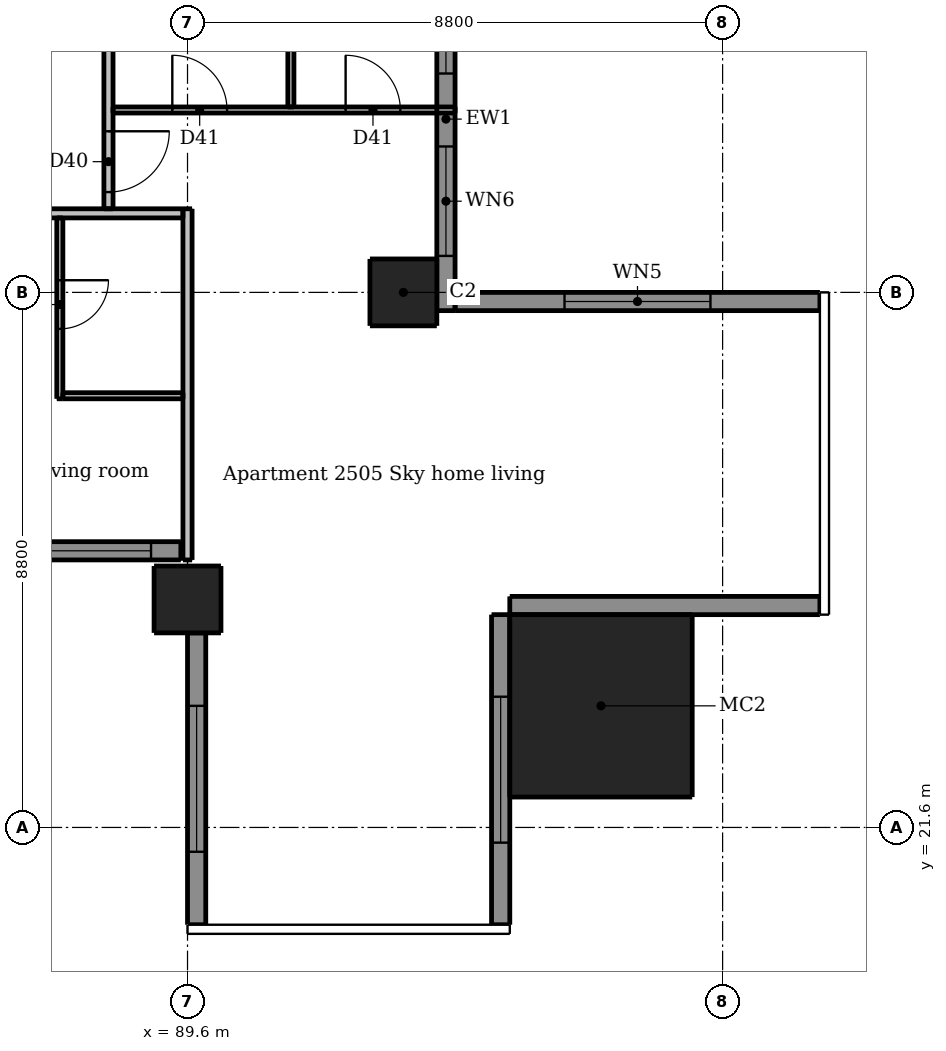
"""IFC4 building model, lengths in metres.
Left out: names, types, materials, properties, quantities, classifications, styles, units other than length and angle.
Written with IfcOpenShell. Run it as: python <this file> out.ifc"""

import sys

from ifc_helpers import new_model, si_unit, direction, frame, frame_2d, origin, origin_2d, place, context, subcontext, project, spatial, rectangle, extrude, element, fill, save


model = new_model("IFC4")
c1 = context("Model", 3, precision=1e-05, world=origin(), true_north=direction((0.0, 1.0)))
c2 = subcontext(c1, "Body", "Model", "MODEL_VIEW")
j1 = project(units=[si_unit("LENGTHUNIT", "METRE"), si_unit("PLANEANGLEUNIT", "RADIAN")], contexts=[c1])
p1 = place(None, origin())
s1 = spatial("IfcSite", under=j1, at=p1, CompositionType="ELEMENT")
p2 = place(p1, origin())
s2 = spatial("IfcBuilding", under=s1, at=p2, CompositionType="ELEMENT")
p3 = place(p2, frame((0.0, 0.0, 95.2)))
s3 = spatial("IfcBuildingStorey", under=s2, at=p3, CompositionType="ELEMENT", Elevation=95.2)
for number, where, z_axis, x_axis in (
    (1, (89.6, 25.35, 0.0), (0.0, 0.0, 1.0), (1.0, 0.0, 0.0)),
    (2, (93.15, 30.4, 0.0), (0.0, 0.0, 1.0), (1.0, 0.0, 0.0)),
):
    element("IfcColumn", number, at=place(p3, frame(where, z_axis=z_axis, x_axis=x_axis)), inside=s3, PredefinedType="COLUMN", context=c2, shape_type="SweptSolid", body=[
        extrude(rectangle(XDim=1.1, YDim=1.1, at=origin_2d()), origin(), (0.0, 0.0, 1.0), 3.05),
    ])
p4 = place(p3, frame((96.4, 23.6, 0.0), z_axis=(0.0, 0.0, 1.0), x_axis=(1.0, 0.0, 0.0)))
e3 = element("IfcColumn", 3, at=p4, inside=s3, PredefinedType="COLUMN", context=c2, shape_type="SweptSolid", body=[
    extrude(rectangle(XDim=3.0, YDim=3.0, at=origin_2d()), origin(), (0.0, 0.0, 1.0), 3.3),
])
p5 = place(p3, frame((89.75, 24.8, 0.0), z_axis=(0.0, 0.0, 1.0), x_axis=(0.0, -1.0, 0.0)))
e4 = element("IfcWall", 4, at=p5, inside=s3, PredefinedType="SOLIDWALL", context=c2, shape_type="SweptSolid", body=[
    extrude(rectangle(XDim=4.8, YDim=0.3, at=frame_2d((2.4, 0.0))), origin(), (0.0, 0.0, 1.0), 3.05),
])
p6 = place(p5, frame((1.2, 0.0, 0.15)))
e5 = element("IfcOpeningElement", 5, at=p6, cuts=e4, PredefinedType="OPENING", context=c2, shape_type="SweptSolid", body=[
    extrude(rectangle(XDim=2.4, YDim=2.1, at=frame_2d((1.2, 1.05))), frame((0.0, 0.16, 0.0), z_axis=(0.0, -1.0, 0.0), x_axis=(1.0, 0.0, 0.0)), (0.0, 0.0, 1.0), 0.32),
])
p7 = place(p3, frame((94.75, 20.0, 0.0), z_axis=(0.0, 0.0, 1.0), x_axis=(0.0, 1.0, 0.0)))
e6 = element("IfcWall", 6, at=p7, inside=s3, PredefinedType="SOLIDWALL", context=c2, shape_type="SweptSolid", body=[
    extrude(rectangle(XDim=5.1, YDim=0.3, at=frame_2d((2.55, 0.0))), origin(), (0.0, 0.0, 1.0), 3.05),
])
p8 = place(p7, frame((1.35, 0.0, 0.15)))
e7 = element("IfcOpeningElement", 7, at=p8, cuts=e6, PredefinedType="OPENING", context=c2, shape_type="SweptSolid", body=[
    extrude(rectangle(XDim=2.4, YDim=2.1, at=frame_2d((1.2, 1.05))), frame((0.0, 0.16, 0.0), z_axis=(0.0, -1.0, 0.0), x_axis=(1.0, 0.0, 0.0)), (0.0, 0.0, 1.0), 0.32),
])
p9 = place(p3, frame((94.9, 25.25, 0.0), z_axis=(0.0, 0.0, 1.0), x_axis=(1.0, 0.0, 0.0)))
e8 = element("IfcWall", 8, at=p9, inside=s3, PredefinedType="SOLIDWALL", context=c2, shape_type="SweptSolid", body=[
    extrude(rectangle(XDim=5.1, YDim=0.3, at=frame_2d((2.55, 0.0))), origin(), (0.0, 0.0, 1.0), 3.05),
])
p10 = place(p3, frame((100.0, 30.25, 0.0), z_axis=(0.0, 0.0, 1.0), x_axis=(-1.0, 0.0, 0.0)))
e9 = element("IfcWall", 9, at=p10, inside=s3, PredefinedType="SOLIDWALL", context=c2, shape_type="SweptSolid", body=[
    extrude(rectangle(XDim=6.0, YDim=0.3, at=frame_2d((3.0, 0.0))), origin(), (0.0, 0.0, 1.0), 3.05),
])
p11 = place(p10, frame((1.8, 0.0, 0.15)))
e10 = element("IfcOpeningElement", 10, at=p11, cuts=e9, PredefinedType="OPENING", context=c2, shape_type="SweptSolid", body=[
    extrude(rectangle(XDim=2.4, YDim=2.1, at=frame_2d((1.2, 1.05))), frame((0.0, 0.16, 0.0), z_axis=(0.0, -1.0, 0.0), x_axis=(1.0, 0.0, 0.0)), (0.0, 0.0, 1.0), 0.32),
])
p12 = place(p3, frame((83.7, 26.15, 0.0), z_axis=(0.0, 0.0, 1.0), x_axis=(1.0, 0.0, 0.0)))
e11 = element("IfcWall", 11, at=p12, inside=s3, PredefinedType="SOLIDWALL", context=c2, shape_type="SweptSolid", body=[
    extrude(rectangle(XDim=5.79, YDim=0.3, at=frame_2d((2.895, 0.0))), origin(), (0.0, 0.0, 1.0), 3.05),
])
p13 = place(p12, frame((0.5, 0.0, 0.15)))
e12 = element("IfcOpeningElement", 12, at=p13, cuts=e11, PredefinedType="OPENING", context=c2, shape_type="SweptSolid", body=[
    extrude(rectangle(XDim=1.8, YDim=2.1, at=frame_2d((0.9, 1.05))), frame((0.0, 0.16, 0.0), z_axis=(0.0, -1.0, 0.0), x_axis=(1.0, 0.0, 0.0)), (0.0, 0.0, 1.0), 0.32),
])
p14 = place(p12, frame((3.5, 0.0, 0.15)))
e13 = element("IfcOpeningElement", 13, at=p14, cuts=e11, PredefinedType="OPENING", context=c2, shape_type="SweptSolid", body=[
    extrude(rectangle(XDim=1.8, YDim=2.1, at=frame_2d((0.9, 1.05))), frame((0.0, 0.16, 0.0), z_axis=(0.0, -1.0, 0.0), x_axis=(1.0, 0.0, 0.0)), (0.0, 0.0, 1.0), 0.32),
])
p15 = place(p3, frame((93.85, 30.1, 0.0), z_axis=(0.0, 0.0, 1.0), x_axis=(0.0, 1.0, 0.0)))
e14 = element("IfcWall", 14, at=p15, inside=s3, PredefinedType="SOLIDWALL", context=c2, shape_type="SweptSolid", body=[
    extrude(rectangle(XDim=6.3, YDim=0.3, at=frame_2d((3.15, 0.0))), origin(), (0.0, 0.0, 1.0), 3.05),
])
p16 = place(p15, frame((0.9, 0.0, 0.15)))
e15 = element("IfcOpeningElement", 15, at=p16, cuts=e14, PredefinedType="OPENING", context=c2, shape_type="SweptSolid", body=[
    extrude(rectangle(XDim=1.8, YDim=2.1, at=frame_2d((0.9, 1.05))), frame((0.0, 0.16, 0.0), z_axis=(0.0, -1.0, 0.0), x_axis=(1.0, 0.0, 0.0)), (0.0, 0.0, 1.0), 0.32),
])
p17 = place(p15, frame((3.9, 0.0, 0.15)))
e16 = element("IfcOpeningElement", 16, at=p17, cuts=e14, PredefinedType="OPENING", context=c2, shape_type="SweptSolid", body=[
    extrude(rectangle(XDim=1.8, YDim=2.1, at=frame_2d((0.9, 1.05))), frame((0.0, 0.16, 0.0), z_axis=(0.0, -1.0, 0.0), x_axis=(1.0, 0.0, 0.0)), (0.0, 0.0, 1.0), 0.32),
])
p18 = place(p3, frame((87.5, 31.625, 0.0), z_axis=(0.0, 0.0, 1.0), x_axis=(0.0, -1.0, 0.0)))
e17 = element("IfcWall", 17, at=p18, inside=s3, PredefinedType="PARTITIONING", context=c2, shape_type="SweptSolid", body=[
    extrude(rectangle(XDim=2.975, YDim=0.1, at=frame_2d((1.488, 0.0))), origin(), (0.0, 0.0, 1.0), 3.05),
])
p19 = place(p18, frame((1.025, 0.0, 0.0)))
e18 = element("IfcOpeningElement", 18, at=p19, cuts=e17, PredefinedType="OPENING", context=c2, shape_type="SweptSolid", body=[
    extrude(rectangle(XDim=0.8, YDim=2.1, at=frame_2d((0.4, 1.05))), frame((0.0, 0.06, 0.0), z_axis=(0.0, -1.0, 0.0), x_axis=(1.0, 0.0, 0.0)), (0.0, 0.0, 1.0), 0.12),
])
p20 = place(p3, frame((91.3, 33.45, 0.0), z_axis=(0.0, 0.0, 1.0), x_axis=(0.0, 1.0, 0.0)))
e19 = element("IfcWall", 19, at=p20, inside=s3, PredefinedType="PARTITIONING", context=c2, shape_type="SweptSolid", body=[
    extrude(rectangle(XDim=5.875, YDim=0.1, at=frame_2d((2.938, 0.0))), origin(), (0.0, 0.0, 1.0), 3.05),
])
p21 = place(p20, frame((3.75, 0.0, 0.0)))
e20 = element("IfcOpeningElement", 20, at=p21, cuts=e19, PredefinedType="OPENING", context=c2, shape_type="SweptSolid", body=[
    extrude(rectangle(XDim=0.8, YDim=2.1, at=frame_2d((0.4, 1.05))), frame((0.0, 0.06, 0.0), z_axis=(0.0, -1.0, 0.0), x_axis=(1.0, 0.0, 0.0)), (0.0, 0.0, 1.0), 0.12),
])
p22 = place(p3, frame((88.375, 33.4, 0.0), z_axis=(0.0, 0.0, 1.0), x_axis=(1.0, 0.0, 0.0)))
e21 = element("IfcWall", 21, at=p22, inside=s3, PredefinedType="PARTITIONING", context=c2, shape_type="SweptSolid", body=[
    extrude(rectangle(XDim=5.625, YDim=0.1, at=frame_2d((2.812, 0.0))), origin(), (0.0, 0.0, 1.0), 3.05),
])
p23 = place(p22, frame((0.975, 0.0, 0.0)))
e22 = element("IfcOpeningElement", 22, at=p23, cuts=e21, PredefinedType="OPENING", context=c2, shape_type="SweptSolid", body=[
    extrude(rectangle(XDim=0.9, YDim=2.1, at=frame_2d((0.45, 1.05))), frame((0.0, 0.06, 0.0), z_axis=(0.0, -1.0, 0.0), x_axis=(1.0, 0.0, 0.0)), (0.0, 0.0, 1.0), 0.12),
])
p24 = place(p22, frame((3.825, 0.0, 0.0)))
e23 = element("IfcOpeningElement", 23, at=p24, cuts=e21, PredefinedType="OPENING", context=c2, shape_type="SweptSolid", body=[
    extrude(rectangle(XDim=0.9, YDim=2.1, at=frame_2d((0.45, 1.05))), frame((0.0, 0.06, 0.0), z_axis=(0.0, -1.0, 0.0), x_axis=(1.0, 0.0, 0.0)), (0.0, 0.0, 1.0), 0.12),
])
p25 = place(p3, frame((87.55, 28.7, 0.0), z_axis=(0.0, 0.0, 1.0), x_axis=(1.0, 0.0, 0.0)))
e24 = element("IfcWall", 24, at=p25, inside=s3, PredefinedType="PARTITIONING", context=c2, shape_type="SweptSolid", body=[
    extrude(rectangle(XDim=1.975, YDim=0.1, at=frame_2d((0.987, 0.0))), origin(), (0.0, 0.0, 1.0), 3.05),
])
p26 = place(p3, frame((88.3, 60.475, 0.0), z_axis=(0.0, 0.0, 1.0), x_axis=(0.0, -1.0, 0.0)))
e25 = element("IfcWall", 25, at=p26, inside=s3, PredefinedType="PARTITIONING", context=c2, shape_type="SweptSolid", body=[
    extrude(rectangle(XDim=28.7, YDim=0.15, at=frame_2d((14.35, 0.0))), origin(), (0.0, 0.0, 1.0), 3.05),
])
p27 = place(p26, frame((27.425, 0.0, 0.0)))
e26 = element("IfcOpeningElement", 26, at=p27, cuts=e25, PredefinedType="OPENING", context=c2, shape_type="SweptSolid", body=[
    extrude(rectangle(XDim=1.0, YDim=2.1, at=frame_2d((0.5, 1.05))), frame((0.0, 0.085, 0.0), z_axis=(0.0, -1.0, 0.0), x_axis=(1.0, 0.0, 0.0)), (0.0, 0.0, 1.0), 0.17),
])
p28 = place(p26, frame((17.575, 0.0, 0.0)))
e27 = element("IfcOpeningElement", 27, at=p28, cuts=e25, PredefinedType="OPENING", context=c2, shape_type="SweptSolid", body=[
    extrude(rectangle(XDim=1.0, YDim=2.1, at=frame_2d((0.5, 1.05))), frame((0.0, 0.085, 0.0), z_axis=(0.0, -1.0, 0.0), x_axis=(1.0, 0.0, 0.0)), (0.0, 0.0, 1.0), 0.17),
])
p29 = place(p26, frame((11.575, 0.0, 0.0)))
e28 = element("IfcOpeningElement", 28, at=p29, cuts=e25, PredefinedType="OPENING", context=c2, shape_type="SweptSolid", body=[
    extrude(rectangle(XDim=1.0, YDim=2.1, at=frame_2d((0.5, 1.05))), frame((0.0, 0.085, 0.0), z_axis=(0.0, -1.0, 0.0), x_axis=(1.0, 0.0, 0.0)), (0.0, 0.0, 1.0), 0.17),
])
p30 = place(p26, frame((3.775, 0.0, 0.0)))
e29 = element("IfcOpeningElement", 29, at=p30, cuts=e25, PredefinedType="OPENING", context=c2, shape_type="SweptSolid", body=[
    extrude(rectangle(XDim=1.0, YDim=2.1, at=frame_2d((0.5, 1.05))), frame((0.0, 0.085, 0.0), z_axis=(0.0, -1.0, 0.0), x_axis=(1.0, 0.0, 0.0)), (0.0, 0.0, 1.0), 0.17),
])
p31 = place(p3, frame((89.6, 26.0, 0.0), z_axis=(0.0, 0.0, 1.0), x_axis=(0.0, 1.0, 0.0)))
e30 = element("IfcWall", 30, at=p31, inside=s3, PredefinedType="PARTITIONING", context=c2, shape_type="SweptSolid", body=[
    extrude(rectangle(XDim=5.775, YDim=0.15, at=frame_2d((2.887, 0.0))), origin(), (0.0, 0.0, 1.0), 2.516),
])
p32 = place(p3, frame((89.525, 31.7, 0.0), z_axis=(0.0, 0.0, 1.0), x_axis=(-1.0, 0.0, 0.0)))
e31 = element("IfcWall", 31, at=p32, inside=s3, PredefinedType="PARTITIONING", context=c2, shape_type="SweptSolid", body=[
    extrude(rectangle(XDim=28.75, YDim=0.15, at=frame_2d((14.375, 0.0))), origin(), (0.0, 0.0, 1.0), 3.05),
])
p33 = place(p32, frame((25.875, 0.0, 0.0)))
e32 = element("IfcOpeningElement", 32, at=p33, cuts=e31, PredefinedType="OPENING", context=c2, shape_type="SweptSolid", body=[
    extrude(rectangle(XDim=1.0, YDim=2.1, at=frame_2d((0.5, 1.05))), frame((0.0, 0.085, 0.0), z_axis=(0.0, -1.0, 0.0), x_axis=(1.0, 0.0, 0.0)), (0.0, 0.0, 1.0), 0.17),
])
p34 = place(p32, frame((14.425, 0.0, 0.0)))
e33 = element("IfcOpeningElement", 33, at=p34, cuts=e31, PredefinedType="OPENING", context=c2, shape_type="SweptSolid", body=[
    extrude(rectangle(XDim=1.0, YDim=2.1, at=frame_2d((0.5, 1.05))), frame((0.0, 0.085, 0.0), z_axis=(0.0, -1.0, 0.0), x_axis=(1.0, 0.0, 0.0)), (0.0, 0.0, 1.0), 0.17),
])
p35 = place(p32, frame((8.425, 0.0, 0.0)))
e34 = element("IfcOpeningElement", 34, at=p35, cuts=e31, PredefinedType="OPENING", context=c2, shape_type="SweptSolid", body=[
    extrude(rectangle(XDim=1.0, YDim=2.1, at=frame_2d((0.5, 1.05))), frame((0.0, 0.085, 0.0), z_axis=(0.0, -1.0, 0.0), x_axis=(1.0, 0.0, 0.0)), (0.0, 0.0, 1.0), 0.17),
])
p36 = place(p32, frame((2.425, 0.0, 0.0)))
e35 = element("IfcOpeningElement", 35, at=p36, cuts=e31, PredefinedType="OPENING", context=c2, shape_type="SweptSolid", body=[
    extrude(rectangle(XDim=1.0, YDim=2.1, at=frame_2d((0.5, 1.05))), frame((0.0, 0.085, 0.0), z_axis=(0.0, -1.0, 0.0), x_axis=(1.0, 0.0, 0.0)), (0.0, 0.0, 1.0), 0.17),
])
p37 = place(p6, origin())
e36 = element("IfcWindow", 36, at=p37, inside=s3, PartitioningType="DOUBLE_PANEL_VERTICAL", PredefinedType="WINDOW", context=c2, shape_type="SweptSolid", body=[
    extrude(rectangle(XDim=2.4, YDim=2.1, at=frame_2d((1.2, 1.05))), frame((0.0, 0.03, 0.0), z_axis=(0.0, -1.0, 0.0), x_axis=(1.0, 0.0, 0.0)), (0.0, 0.0, 1.0), 0.06),
])
fill(e5, e36)
p38 = place(p8, origin())
e37 = element("IfcWindow", 37, at=p38, inside=s3, PartitioningType="DOUBLE_PANEL_VERTICAL", PredefinedType="WINDOW", context=c2, shape_type="SweptSolid", body=[
    extrude(rectangle(XDim=2.4, YDim=2.1, at=frame_2d((1.2, 1.05))), frame((0.0, 0.03, 0.0), z_axis=(0.0, -1.0, 0.0), x_axis=(1.0, 0.0, 0.0)), (0.0, 0.0, 1.0), 0.06),
])
fill(e7, e37)
p39 = place(p11, origin())
e38 = element("IfcWindow", 38, at=p39, inside=s3, PartitioningType="DOUBLE_PANEL_VERTICAL", PredefinedType="WINDOW", context=c2, shape_type="SweptSolid", body=[
    extrude(rectangle(XDim=2.4, YDim=2.1, at=frame_2d((1.2, 1.05))), frame((0.0, 0.03, 0.0), z_axis=(0.0, -1.0, 0.0), x_axis=(1.0, 0.0, 0.0)), (0.0, 0.0, 1.0), 0.06),
])
fill(e10, e38)
p40 = place(p14, origin())
e39 = element("IfcWindow", 39, at=p40, inside=s3, PartitioningType="DOUBLE_PANEL_VERTICAL", PredefinedType="WINDOW", context=c2, shape_type="SweptSolid", body=[
    extrude(rectangle(XDim=1.8, YDim=2.1, at=frame_2d((0.9, 1.05))), frame((0.0, 0.03, 0.0), z_axis=(0.0, -1.0, 0.0), x_axis=(1.0, 0.0, 0.0)), (0.0, 0.0, 1.0), 0.06),
])
fill(e13, e39)
p41 = place(p16, origin())
e40 = element("IfcWindow", 40, at=p41, inside=s3, PartitioningType="DOUBLE_PANEL_VERTICAL", PredefinedType="WINDOW", context=c2, shape_type="SweptSolid", body=[
    extrude(rectangle(XDim=1.8, YDim=2.1, at=frame_2d((0.9, 1.05))), frame((0.0, 0.03, 0.0), z_axis=(0.0, -1.0, 0.0), x_axis=(1.0, 0.0, 0.0)), (0.0, 0.0, 1.0), 0.06),
])
fill(e15, e40)
p42 = place(p17, origin())
e41 = element("IfcWindow", 41, at=p42, inside=s3, PartitioningType="DOUBLE_PANEL_VERTICAL", PredefinedType="WINDOW", context=c2, shape_type="SweptSolid", body=[
    extrude(rectangle(XDim=1.8, YDim=2.1, at=frame_2d((0.9, 1.05))), frame((0.0, 0.03, 0.0), z_axis=(0.0, -1.0, 0.0), x_axis=(1.0, 0.0, 0.0)), (0.0, 0.0, 1.0), 0.06),
])
fill(e16, e41)
p43 = place(p19, origin())
e42 = element("IfcDoor", 42, at=p43, inside=s3, OperationType="SINGLE_SWING_LEFT", PredefinedType="DOOR", context=c2, shape_type="SweptSolid", body=[
    extrude(rectangle(XDim=0.8, YDim=2.1, at=frame_2d((0.4, 1.05))), frame((0.0, 0.025, 0.0), z_axis=(0.0, -1.0, 0.0), x_axis=(1.0, 0.0, 0.0)), (0.0, 0.0, 1.0), 0.05),
])
fill(e18, e42)
p44 = place(p27, origin())
e43 = element("IfcDoor", 43, at=p44, inside=s3, OperationType="SINGLE_SWING_LEFT", PredefinedType="DOOR", context=c2, shape_type="SweptSolid", body=[
    extrude(rectangle(XDim=1.0, YDim=2.1, at=frame_2d((0.5, 1.05))), frame((0.0, 0.025, 0.0), z_axis=(0.0, -1.0, 0.0), x_axis=(1.0, 0.0, 0.0)), (0.0, 0.0, 1.0), 0.05),
])
fill(e26, e43)
p45 = place(p23, origin())
e44 = element("IfcDoor", 44, at=p45, inside=s3, OperationType="SINGLE_SWING_LEFT", PredefinedType="DOOR", context=c2, shape_type="SweptSolid", body=[
    extrude(rectangle(XDim=0.9, YDim=2.1, at=frame_2d((0.45, 1.05))), frame((0.0, 0.025, 0.0), z_axis=(0.0, -1.0, 0.0), x_axis=(1.0, 0.0, 0.0)), (0.0, 0.0, 1.0), 0.05),
])
fill(e22, e44)
p46 = place(p24, origin())
e45 = element("IfcDoor", 45, at=p46, inside=s3, OperationType="SINGLE_SWING_LEFT", PredefinedType="DOOR", context=c2, shape_type="SweptSolid", body=[
    extrude(rectangle(XDim=0.9, YDim=2.1, at=frame_2d((0.45, 1.05))), frame((0.0, 0.025, 0.0), z_axis=(0.0, -1.0, 0.0), x_axis=(1.0, 0.0, 0.0)), (0.0, 0.0, 1.0), 0.05),
])
fill(e23, e45)
save(model, sys.argv[1])
